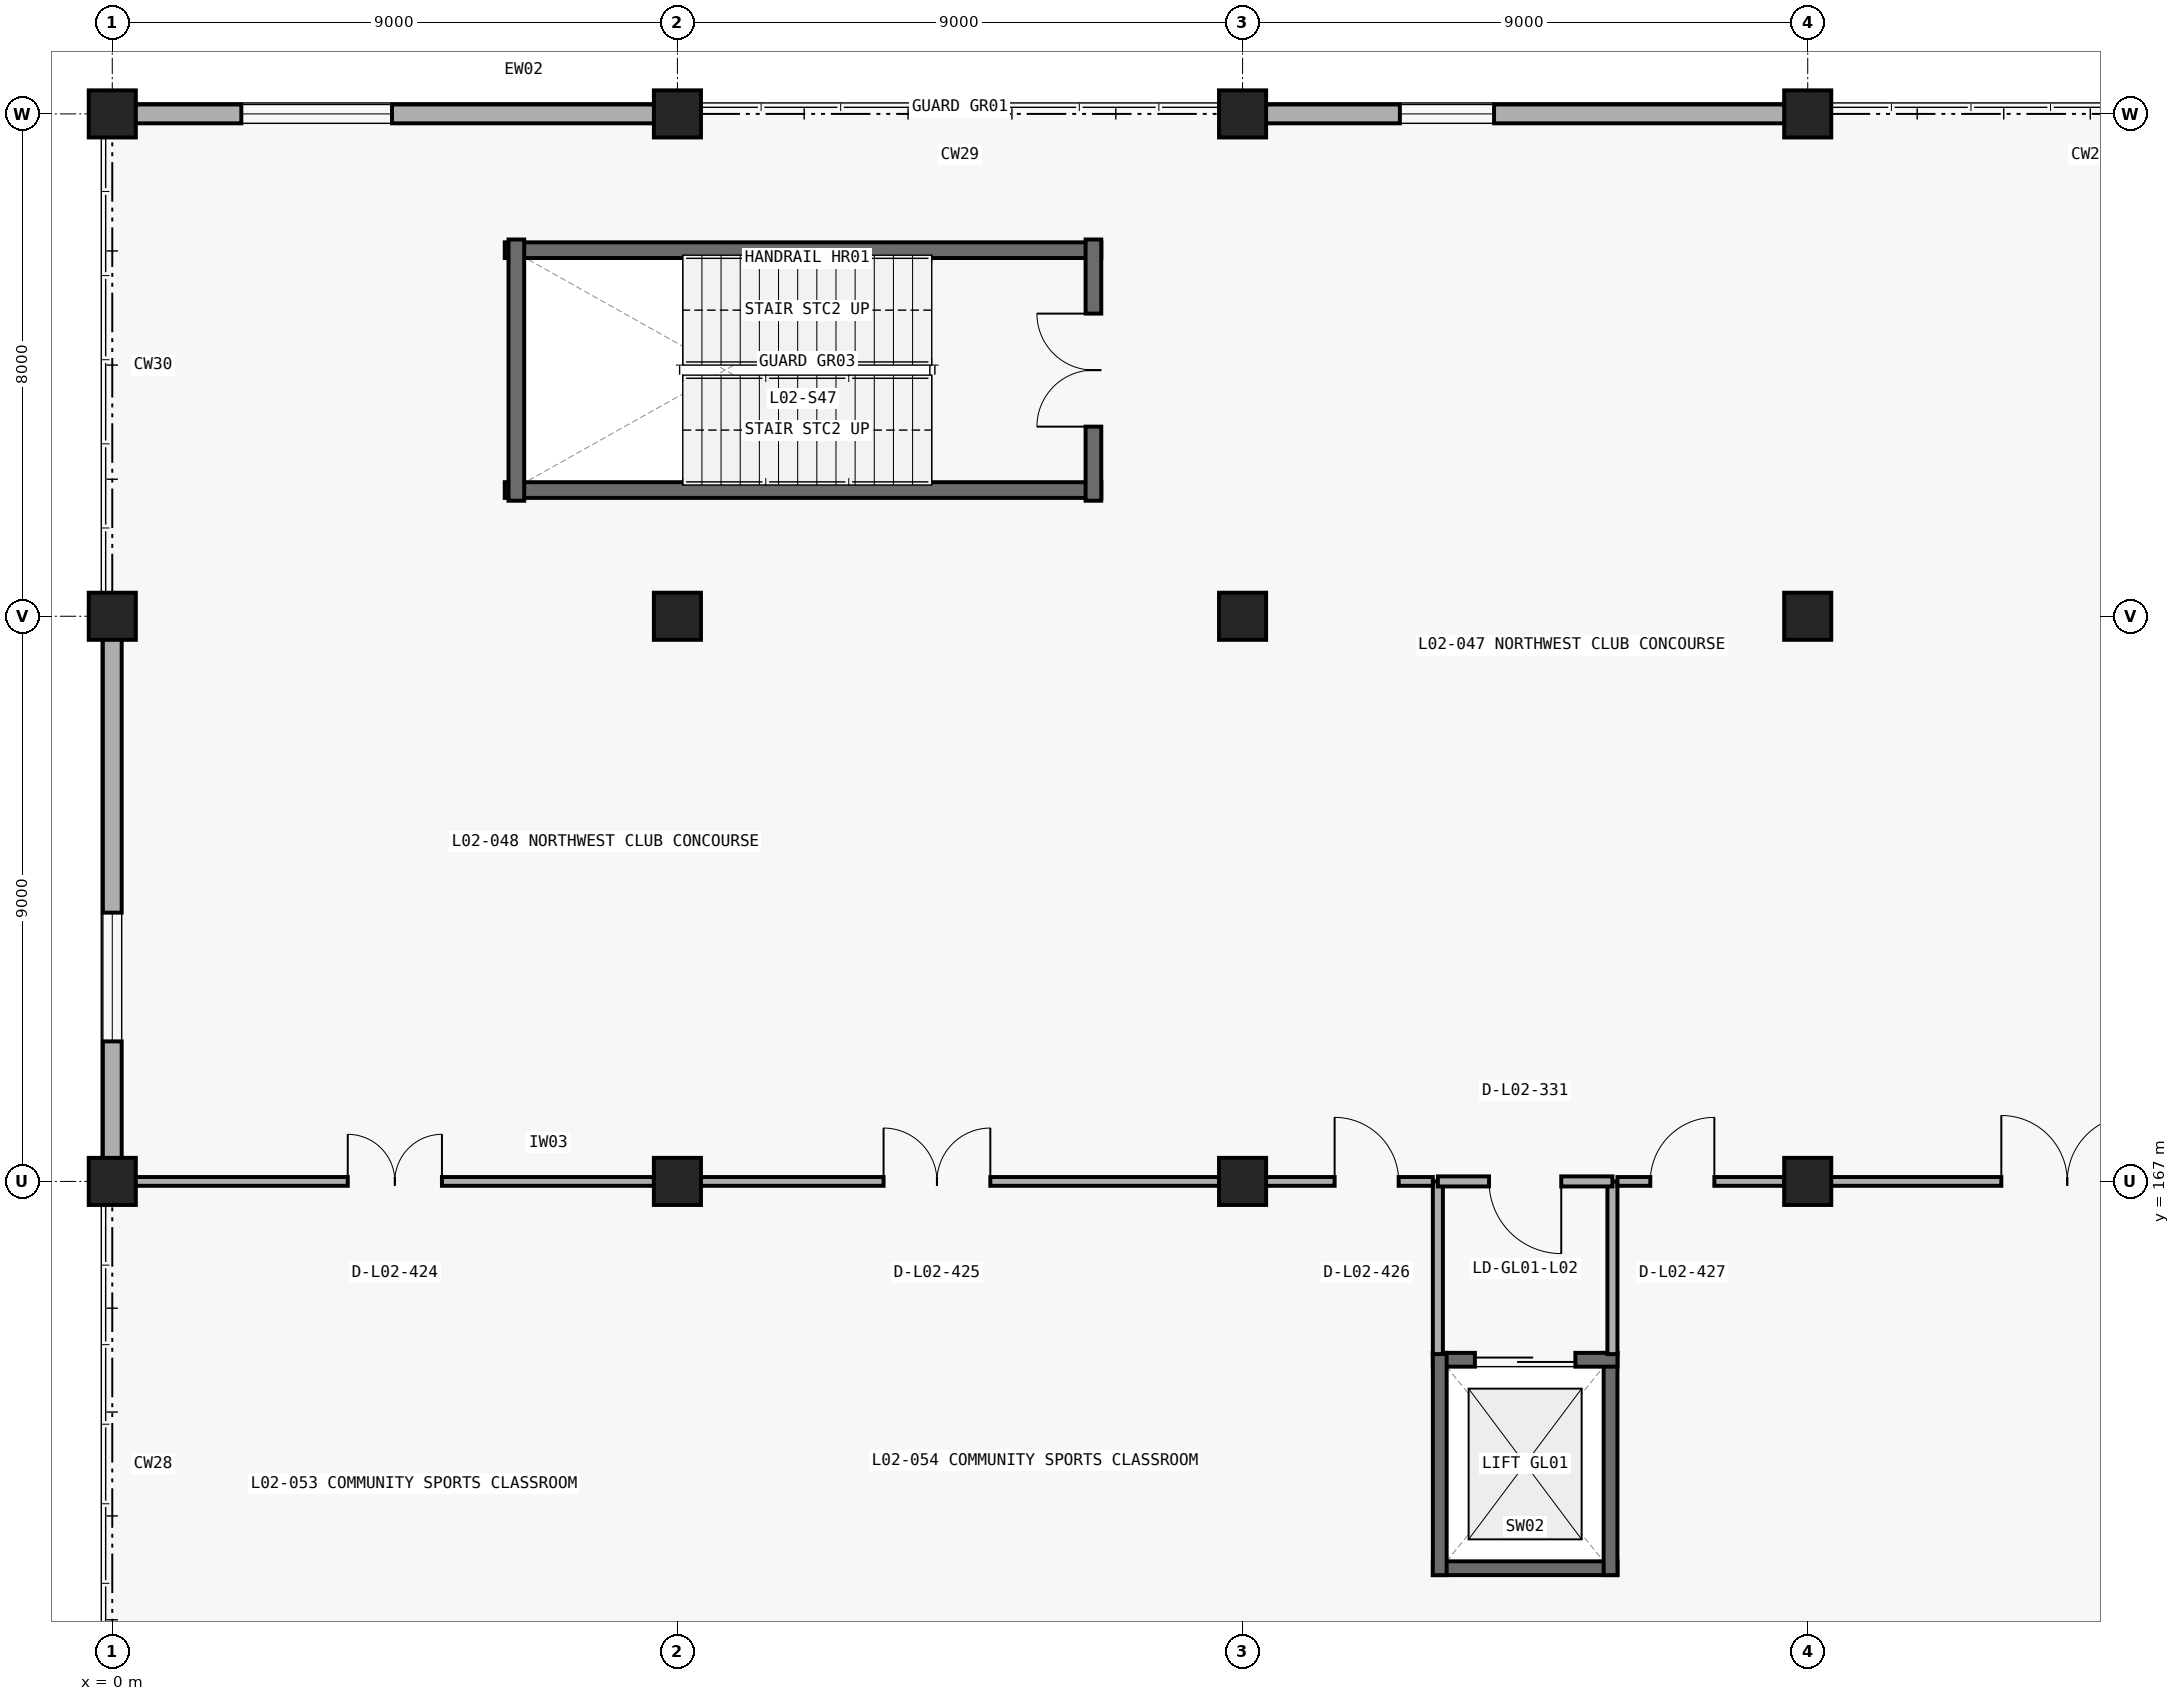
"""IFC4 building model, lengths in metres.
Left out: names, types, materials, properties, quantities, classifications, styles, units other than length and angle.
Written with IfcOpenShell. Run it as: python <this file> out.ifc"""

import sys

from ifc_helpers import new_model, si_unit, direction, frame, frame_2d, origin, origin_2d, place, context, subcontext, project, spatial, rectangle, extrude, element, fill, save


model = new_model("IFC4")
c1 = context("Model", 3, precision=1e-05, world=origin(), true_north=direction((0.0, 1.0)))
c2 = subcontext(c1, "Body", "Model", "MODEL_VIEW")
j1 = project(units=[si_unit("LENGTHUNIT", "METRE"), si_unit("PLANEANGLEUNIT", "RADIAN")], contexts=[c1])
p1 = place(None, origin())
s1 = spatial("IfcSite", under=j1, at=p1, CompositionType="ELEMENT")
p2 = place(p1, origin())
s2 = spatial("IfcBuilding", under=s1, at=p2, CompositionType="ELEMENT")
p3 = place(p2, frame((0.0, 0.0, 10.2)))
s3 = spatial("IfcBuildingStorey", under=s2, at=p3, CompositionType="ELEMENT", Elevation=10.2)
for number, where, z_axis, x_axis in (
    (1, (0.0, 167.0, 0.0), (0.0, 0.0, 1.0), (1.0, 0.0, 0.0)),
    (2, (0.0, 176.0, 0.0), (0.0, 0.0, 1.0), (1.0, 0.0, 0.0)),
    (3, (0.0, 184.0, 0.0), (0.0, 0.0, 1.0), (1.0, 0.0, 0.0)),
    (4, (9.0, 167.0, 0.0), (0.0, 0.0, 1.0), (1.0, 0.0, 0.0)),
    (5, (9.0, 176.0, 0.0), (0.0, 0.0, 1.0), (1.0, 0.0, 0.0)),
    (6, (9.0, 184.0, 0.0), (0.0, 0.0, 1.0), (1.0, 0.0, 0.0)),
    (7, (18.0, 167.0, 0.0), (0.0, 0.0, 1.0), (1.0, 0.0, 0.0)),
    (8, (18.0, 176.0, 0.0), (0.0, 0.0, 1.0), (1.0, 0.0, 0.0)),
    (9, (18.0, 184.0, 0.0), (0.0, 0.0, 1.0), (1.0, 0.0, 0.0)),
    (10, (27.0, 167.0, 0.0), (0.0, 0.0, 1.0), (1.0, 0.0, 0.0)),
    (11, (27.0, 176.0, 0.0), (0.0, 0.0, 1.0), (1.0, 0.0, 0.0)),
    (12, (27.0, 184.0, 0.0), (0.0, 0.0, 1.0), (1.0, 0.0, 0.0)),
):
    element("IfcColumn", number, at=place(p3, frame(where, z_axis=z_axis, x_axis=x_axis)), inside=s3, PredefinedType="COLUMN", context=c2, shape_type="SweptSolid", body=[
        extrude(rectangle(XDim=0.75, YDim=0.75, at=origin_2d()), origin(), (0.0, 0.0, 1.0), 4.8),
    ])
p4 = place(p3, frame((0.0, 167.35, 0.0), z_axis=(0.0, 0.0, 1.0), x_axis=(0.0, 1.0, 0.0)))
e13 = element("IfcWall", 13, at=p4, inside=s3, PredefinedType="STANDARD", context=c2, shape_type="SweptSolid", body=[
    extrude(rectangle(XDim=8.3, YDim=0.3, at=frame_2d((4.15, 0.0))), origin(), (0.0, 0.0, 1.0), 3.817),
])
p5 = place(p4, frame((1.88, 0.0, 0.95)))
e14 = element("IfcOpeningElement", 14, at=p5, cuts=e13, PredefinedType="OPENING", context=c2, shape_type="SweptSolid", body=[
    extrude(rectangle(XDim=2.05, YDim=2.2, at=frame_2d((1.025, 1.1))), frame((0.0, 0.16, 0.0), z_axis=(0.0, -1.0, 0.0), x_axis=(1.0, 0.0, 0.0)), (0.0, 0.0, 1.0), 0.32),
])
p6 = place(p3, frame((0.35, 184.0, 0.0), z_axis=(0.0, 0.0, 1.0), x_axis=(1.0, 0.0, 0.0)))
e15 = element("IfcWall", 15, at=p6, inside=s3, PredefinedType="STANDARD", context=c2, shape_type="SweptSolid", body=[
    extrude(rectangle(XDim=8.3, YDim=0.3, at=frame_2d((4.15, 0.0))), origin(), (0.0, 0.0, 1.0), 3.855),
])
p7 = place(p6, frame((1.705, 0.0, 0.95)))
e16 = element("IfcOpeningElement", 16, at=p7, cuts=e15, PredefinedType="OPENING", context=c2, shape_type="SweptSolid", body=[
    extrude(rectangle(XDim=2.4, YDim=2.2, at=frame_2d((1.2, 1.1))), frame((0.0, 0.16, 0.0), z_axis=(0.0, -1.0, 0.0), x_axis=(1.0, 0.0, 0.0)), (0.0, 0.0, 1.0), 0.32),
])
p8 = place(p3, frame((18.35, 184.0, 0.0), z_axis=(0.0, 0.0, 1.0), x_axis=(1.0, 0.0, 0.0)))
e17 = element("IfcWall", 17, at=p8, inside=s3, PredefinedType="STANDARD", context=c2, shape_type="SweptSolid", body=[
    extrude(rectangle(XDim=8.3, YDim=0.3, at=frame_2d((4.15, 0.0))), origin(), (0.0, 0.0, 1.0), 3.855),
])
p9 = place(p8, frame((2.155, 0.0, 0.95)))
e18 = element("IfcOpeningElement", 18, at=p9, cuts=e17, PredefinedType="OPENING", context=c2, shape_type="SweptSolid", body=[
    extrude(rectangle(XDim=1.5, YDim=2.0, at=frame_2d((0.75, 1.0))), frame((0.0, 0.16, 0.0), z_axis=(0.0, -1.0, 0.0), x_axis=(1.0, 0.0, 0.0)), (0.0, 0.0, 1.0), 0.32),
])
for number, where, z_axis, x_axis in (
    (19, (15.75, 181.83, 0.0), (0.0, 0.0, 1.0), (-1.0, 0.0, 0.0)),
    (20, (6.25, 178.01, 0.0), (0.0, 0.0, 1.0), (1.0, 0.0, 0.0)),
):
    element("IfcWall", number, at=place(p3, frame(where, z_axis=z_axis, x_axis=x_axis)), inside=s3, PredefinedType="SHEAR", context=c2, shape_type="SweptSolid", body=[
        extrude(rectangle(XDim=9.5, YDim=0.25, at=frame_2d((4.75, 0.0))), origin(), (0.0, 0.0, 1.0), 4.5),
    ])
p10 = place(p3, frame((15.625, 177.84, 0.0), z_axis=(0.0, 0.0, 1.0), x_axis=(0.0, 1.0, 0.0)))
e21 = element("IfcWall", 21, at=p10, inside=s3, PredefinedType="SHEAR", context=c2, shape_type="SweptSolid", body=[
    extrude(rectangle(XDim=4.16, YDim=0.25, at=frame_2d((2.08, 0.0))), origin(), (0.0, 0.0, 1.0), 4.5),
])
p11 = place(p10, frame((1.18, 0.0, 0.0)))
e22 = element("IfcOpeningElement", 22, at=p11, cuts=e21, PredefinedType="OPENING", context=c2, shape_type="SweptSolid", body=[
    extrude(rectangle(XDim=1.8, YDim=2.25, at=frame_2d((0.9, 1.125))), frame((0.0, 0.135, 0.0), z_axis=(0.0, -1.0, 0.0), x_axis=(1.0, 0.0, 0.0)), (0.0, 0.0, 1.0), 0.27),
])
p12 = place(p3, frame((6.435, 182.0, 0.0), z_axis=(0.0, 0.0, 1.0), x_axis=(0.0, -1.0, 0.0)))
e23 = element("IfcWall", 23, at=p12, inside=s3, PredefinedType="SHEAR", context=c2, shape_type="SweptSolid", body=[
    extrude(rectangle(XDim=4.16, YDim=0.25, at=frame_2d((2.08, 0.0))), origin(), (0.0, 0.0, 1.0), 4.5),
])
p13 = place(p3, frame((21.03, 160.84, 0.0), z_axis=(0.0, 0.0, 1.0), x_axis=(1.0, 0.0, 0.0)))
e24 = element("IfcWall", 24, at=p13, inside=s3, PredefinedType="SHEAR", context=c2, shape_type="SweptSolid", body=[
    extrude(rectangle(XDim=2.94, YDim=0.22, at=frame_2d((1.47, 0.0))), origin(), (0.0, 0.0, 1.0), 4.5),
])
p14 = place(p3, frame((23.86, 160.73, 0.0), z_axis=(0.0, 0.0, 1.0), x_axis=(0.0, 1.0, 0.0)))
e25 = element("IfcWall", 25, at=p14, inside=s3, PredefinedType="SHEAR", context=c2, shape_type="SweptSolid", body=[
    extrude(rectangle(XDim=3.54, YDim=0.22, at=frame_2d((1.77, 0.0))), origin(), (0.0, 0.0, 1.0), 4.5),
])
p15 = place(p3, frame((23.97, 164.16, 0.0), z_axis=(0.0, 0.0, 1.0), x_axis=(-1.0, 0.0, 0.0)))
e26 = element("IfcWall", 26, at=p15, inside=s3, PredefinedType="SHEAR", context=c2, shape_type="SweptSolid", body=[
    extrude(rectangle(XDim=2.94, YDim=0.22, at=frame_2d((1.47, 0.0))), origin(), (0.0, 0.0, 1.0), 4.5),
])
p16 = place(p15, frame((0.67, 0.0, 0.0)))
e27 = element("IfcOpeningElement", 27, at=p16, cuts=e26, PredefinedType="OPENING", context=c2, shape_type="SweptSolid", body=[
    extrude(rectangle(XDim=1.6, YDim=2.3, at=frame_2d((0.8, 1.15))), frame((0.0, 0.12, 0.0), z_axis=(0.0, -1.0, 0.0), x_axis=(1.0, 0.0, 0.0)), (0.0, 0.0, 1.0), 0.24),
])
p17 = place(p3, frame((21.14, 164.27, 0.0), z_axis=(0.0, 0.0, 1.0), x_axis=(0.0, -1.0, 0.0)))
e28 = element("IfcWall", 28, at=p17, inside=s3, PredefinedType="SHEAR", context=c2, shape_type="SweptSolid", body=[
    extrude(rectangle(XDim=3.54, YDim=0.22, at=frame_2d((1.77, 0.0))), origin(), (0.0, 0.0, 1.0), 4.5),
])
for number, where, z_axis, x_axis in (
    (29, (23.89, 164.25, 0.0), (0.0, 0.0, 1.0), (0.0, 1.0, 0.0)),
    (30, (21.11, 164.25, 0.0), (0.0, 0.0, 1.0), (0.0, 1.0, 0.0)),
):
    element("IfcWall", number, at=place(p3, frame(where, z_axis=z_axis, x_axis=x_axis)), inside=s3, PredefinedType="PARTITIONING", context=c2, shape_type="SweptSolid", body=[
        extrude(rectangle(XDim=2.75, YDim=0.16, at=frame_2d((1.375, 0.0))), origin(), (0.0, 0.0, 1.0), 3.855),
    ])
p18 = place(p3, frame((23.89, 167.0, 0.0), z_axis=(0.0, 0.0, 1.0), x_axis=(-1.0, 0.0, 0.0)))
e31 = element("IfcWall", 31, at=p18, inside=s3, PredefinedType="PARTITIONING", context=c2, shape_type="SweptSolid", body=[
    extrude(rectangle(XDim=2.78, YDim=0.16, at=frame_2d((1.39, 0.0))), origin(), (0.0, 0.0, 1.0), 3.855),
])
p19 = place(p18, frame((0.815, 0.0, 0.0)))
e32 = element("IfcOpeningElement", 32, at=p19, cuts=e31, PredefinedType="OPENING", context=c2, shape_type="SweptSolid", body=[
    extrude(rectangle(XDim=1.15, YDim=2.2, at=frame_2d((0.575, 1.1))), frame((0.0, 0.09, 0.0), z_axis=(0.0, -1.0, 0.0), x_axis=(1.0, 0.0, 0.0)), (0.0, 0.0, 1.0), 0.18),
])
p20 = place(p3, frame((0.36, 167.0, 0.0), z_axis=(0.0, 0.0, 1.0), x_axis=(1.0, 0.0, 0.0)))
e33 = element("IfcWall", 33, at=p20, inside=s3, PredefinedType="PARTITIONING", context=c2, shape_type="SweptSolid", body=[
    extrude(rectangle(XDim=8.28, YDim=0.14, at=frame_2d((4.14, 0.0))), origin(), (0.0, 0.0, 1.0), 3.855),
])
p21 = place(p20, frame((3.39, 0.0, 0.0)))
e34 = element("IfcOpeningElement", 34, at=p21, cuts=e33, PredefinedType="OPENING", context=c2, shape_type="SweptSolid", body=[
    extrude(rectangle(XDim=1.5, YDim=2.15, at=frame_2d((0.75, 1.075))), frame((0.0, 0.08, 0.0), z_axis=(0.0, -1.0, 0.0), x_axis=(1.0, 0.0, 0.0)), (0.0, 0.0, 1.0), 0.16),
])
p22 = place(p3, frame((8.625, 167.0, 0.0), z_axis=(0.0, 0.0, 1.0), x_axis=(1.0, 0.0, 0.0)))
e35 = element("IfcWall", 35, at=p22, inside=s3, PredefinedType="PARTITIONING", context=c2, shape_type="SweptSolid", body=[
    extrude(rectangle(XDim=9.015, YDim=0.14, at=frame_2d((4.507, 0.0))), origin(), (0.0, 0.0, 1.0), 3.855),
])
p23 = place(p22, frame((3.658, 0.0, 0.0)))
e36 = element("IfcOpeningElement", 36, at=p23, cuts=e35, PredefinedType="OPENING", context=c2, shape_type="SweptSolid", body=[
    extrude(rectangle(XDim=1.7, YDim=2.2, at=frame_2d((0.85, 1.1))), frame((0.0, 0.08, 0.0), z_axis=(0.0, -1.0, 0.0), x_axis=(1.0, 0.0, 0.0)), (0.0, 0.0, 1.0), 0.16),
])
p24 = place(p3, frame((17.625, 167.0, 0.0), z_axis=(0.0, 0.0, 1.0), x_axis=(1.0, 0.0, 0.0)))
e37 = element("IfcWall", 37, at=p24, inside=s3, PredefinedType="PARTITIONING", context=c2, shape_type="SweptSolid", body=[
    extrude(rectangle(XDim=3.405, YDim=0.14, at=frame_2d((1.703, 0.0))), origin(), (0.0, 0.0, 1.0), 3.855),
])
p25 = place(p24, frame((1.841, 0.0, 0.0)))
e38 = element("IfcOpeningElement", 38, at=p25, cuts=e37, PredefinedType="OPENING", context=c2, shape_type="SweptSolid", body=[
    extrude(rectangle(XDim=1.02, YDim=2.2, at=frame_2d((0.51, 1.1))), frame((0.0, 0.08, 0.0), z_axis=(0.0, -1.0, 0.0), x_axis=(1.0, 0.0, 0.0)), (0.0, 0.0, 1.0), 0.16),
])
p26 = place(p3, frame((23.97, 167.0, 0.0), z_axis=(0.0, 0.0, 1.0), x_axis=(1.0, 0.0, 0.0)))
e39 = element("IfcWall", 39, at=p26, inside=s3, PredefinedType="PARTITIONING", context=c2, shape_type="SweptSolid", body=[
    extrude(rectangle(XDim=2.67, YDim=0.14, at=frame_2d((1.335, 0.0))), origin(), (0.0, 0.0, 1.0), 3.855),
])
p27 = place(p26, frame((0.523, 0.0, 0.0)))
e40 = element("IfcOpeningElement", 40, at=p27, cuts=e39, PredefinedType="OPENING", context=c2, shape_type="SweptSolid", body=[
    extrude(rectangle(XDim=1.02, YDim=2.2, at=frame_2d((0.51, 1.1))), frame((0.0, 0.08, 0.0), z_axis=(0.0, -1.0, 0.0), x_axis=(1.0, 0.0, 0.0)), (0.0, 0.0, 1.0), 0.16),
])
p28 = place(p3, frame((26.625, 167.0, 0.0), z_axis=(0.0, 0.0, 1.0), x_axis=(1.0, 0.0, 0.0)))
e41 = element("IfcWall", 41, at=p28, inside=s3, PredefinedType="PARTITIONING", context=c2, shape_type="SweptSolid", body=[
    extrude(rectangle(XDim=9.015, YDim=0.14, at=frame_2d((4.507, 0.0))), origin(), (0.0, 0.0, 1.0), 3.855),
])
p29 = place(p28, frame((3.458, 0.0, 0.0)))
e42 = element("IfcOpeningElement", 42, at=p29, cuts=e41, PredefinedType="OPENING", context=c2, shape_type="SweptSolid", body=[
    extrude(rectangle(XDim=2.1, YDim=2.35, at=frame_2d((1.05, 1.175))), frame((0.0, 0.08, 0.0), z_axis=(0.0, -1.0, 0.0), x_axis=(1.0, 0.0, 0.0)), (0.0, 0.0, 1.0), 0.16),
])
p30 = place(p5, origin())
e43 = element("IfcWindow", 43, at=p30, inside=s3, PartitioningType="SINGLE_PANEL", PredefinedType="WINDOW", context=c2, shape_type="SweptSolid", body=[
    extrude(rectangle(XDim=2.05, YDim=2.2, at=frame_2d((1.025, 1.1))), frame((0.0, 0.03, 0.0), z_axis=(0.0, -1.0, 0.0), x_axis=(1.0, 0.0, 0.0)), (0.0, 0.0, 1.0), 0.06),
])
fill(e14, e43)
p31 = place(p7, origin())
e44 = element("IfcWindow", 44, at=p31, inside=s3, PartitioningType="SINGLE_PANEL", PredefinedType="WINDOW", context=c2, shape_type="SweptSolid", body=[
    extrude(rectangle(XDim=2.4, YDim=2.2, at=frame_2d((1.2, 1.1))), frame((0.0, 0.03, 0.0), z_axis=(0.0, -1.0, 0.0), x_axis=(1.0, 0.0, 0.0)), (0.0, 0.0, 1.0), 0.06),
])
fill(e16, e44)
p32 = place(p9, origin())
e45 = element("IfcWindow", 45, at=p32, inside=s3, PartitioningType="SINGLE_PANEL", PredefinedType="WINDOW", context=c2, shape_type="SweptSolid", body=[
    extrude(rectangle(XDim=1.5, YDim=2.0, at=frame_2d((0.75, 1.0))), frame((0.0, 0.03, 0.0), z_axis=(0.0, -1.0, 0.0), x_axis=(1.0, 0.0, 0.0)), (0.0, 0.0, 1.0), 0.06),
])
fill(e18, e45)
p33 = place(p11, origin())
e46 = element("IfcDoor", 46, at=p33, inside=s3, OperationType="DOUBLE_DOOR_SINGLE_SWING", PredefinedType="DOOR", context=c2, shape_type="SweptSolid", body=[
    extrude(rectangle(XDim=1.8, YDim=2.25, at=frame_2d((0.9, 1.125))), frame((0.0, 0.025, 0.0), z_axis=(0.0, -1.0, 0.0), x_axis=(1.0, 0.0, 0.0)), (0.0, 0.0, 1.0), 0.05),
])
fill(e22, e46)
p34 = place(p16, origin())
e47 = element("IfcDoor", 47, at=p34, inside=s3, OperationType="SLIDING_TO_LEFT", PredefinedType="DOOR", context=c2, shape_type="SweptSolid", body=[
    extrude(rectangle(XDim=1.6, YDim=2.3, at=frame_2d((0.8, 1.15))), frame((0.0, 0.025, 0.0), z_axis=(0.0, -1.0, 0.0), x_axis=(1.0, 0.0, 0.0)), (0.0, 0.0, 1.0), 0.05),
])
fill(e27, e47)
p35 = place(p19, origin())
e48 = element("IfcDoor", 48, at=p35, inside=s3, OperationType="SINGLE_SWING_LEFT", PredefinedType="DOOR", context=c2, shape_type="SweptSolid", body=[
    extrude(rectangle(XDim=1.15, YDim=2.2, at=frame_2d((0.575, 1.1))), frame((0.0, 0.025, 0.0), z_axis=(0.0, -1.0, 0.0), x_axis=(1.0, 0.0, 0.0)), (0.0, 0.0, 1.0), 0.05),
])
fill(e32, e48)
p36 = place(p21, origin())
e49 = element("IfcDoor", 49, at=p36, inside=s3, OperationType="DOUBLE_DOOR_SINGLE_SWING", PredefinedType="DOOR", context=c2, shape_type="SweptSolid", body=[
    extrude(rectangle(XDim=1.5, YDim=2.15, at=frame_2d((0.75, 1.075))), frame((0.0, 0.025, 0.0), z_axis=(0.0, -1.0, 0.0), x_axis=(1.0, 0.0, 0.0)), (0.0, 0.0, 1.0), 0.05),
])
fill(e34, e49)
p37 = place(p23, origin())
e50 = element("IfcDoor", 50, at=p37, inside=s3, OperationType="DOUBLE_DOOR_SINGLE_SWING", PredefinedType="DOOR", context=c2, shape_type="SweptSolid", body=[
    extrude(rectangle(XDim=1.7, YDim=2.2, at=frame_2d((0.85, 1.1))), frame((0.0, 0.025, 0.0), z_axis=(0.0, -1.0, 0.0), x_axis=(1.0, 0.0, 0.0)), (0.0, 0.0, 1.0), 0.05),
])
fill(e36, e50)
p38 = place(p25, origin())
e51 = element("IfcDoor", 51, at=p38, inside=s3, OperationType="SINGLE_SWING_LEFT", PredefinedType="DOOR", context=c2, shape_type="SweptSolid", body=[
    extrude(rectangle(XDim=1.02, YDim=2.2, at=frame_2d((0.51, 1.1))), frame((0.0, 0.025, 0.0), z_axis=(0.0, -1.0, 0.0), x_axis=(1.0, 0.0, 0.0)), (0.0, 0.0, 1.0), 0.05),
])
fill(e38, e51)
p39 = place(p27, origin())
e52 = element("IfcDoor", 52, at=p39, inside=s3, OperationType="SINGLE_SWING_RIGHT", PredefinedType="DOOR", context=c2, shape_type="SweptSolid", body=[
    extrude(rectangle(XDim=1.02, YDim=2.2, at=frame_2d((0.51, 1.1))), frame((0.0, 0.025, 0.0), z_axis=(0.0, -1.0, 0.0), x_axis=(1.0, 0.0, 0.0)), (0.0, 0.0, 1.0), 0.05),
])
fill(e40, e52)
p40 = place(p29, origin())
e53 = element("IfcDoor", 53, at=p40, inside=s3, OperationType="DOUBLE_DOOR_SINGLE_SWING", PredefinedType="DOOR", context=c2, shape_type="SweptSolid", body=[
    extrude(rectangle(XDim=2.1, YDim=2.35, at=frame_2d((1.05, 1.175))), frame((0.0, 0.025, 0.0), z_axis=(0.0, -1.0, 0.0), x_axis=(1.0, 0.0, 0.0)), (0.0, 0.0, 1.0), 0.05),
])
fill(e42, e53)
save(model, sys.argv[1])
